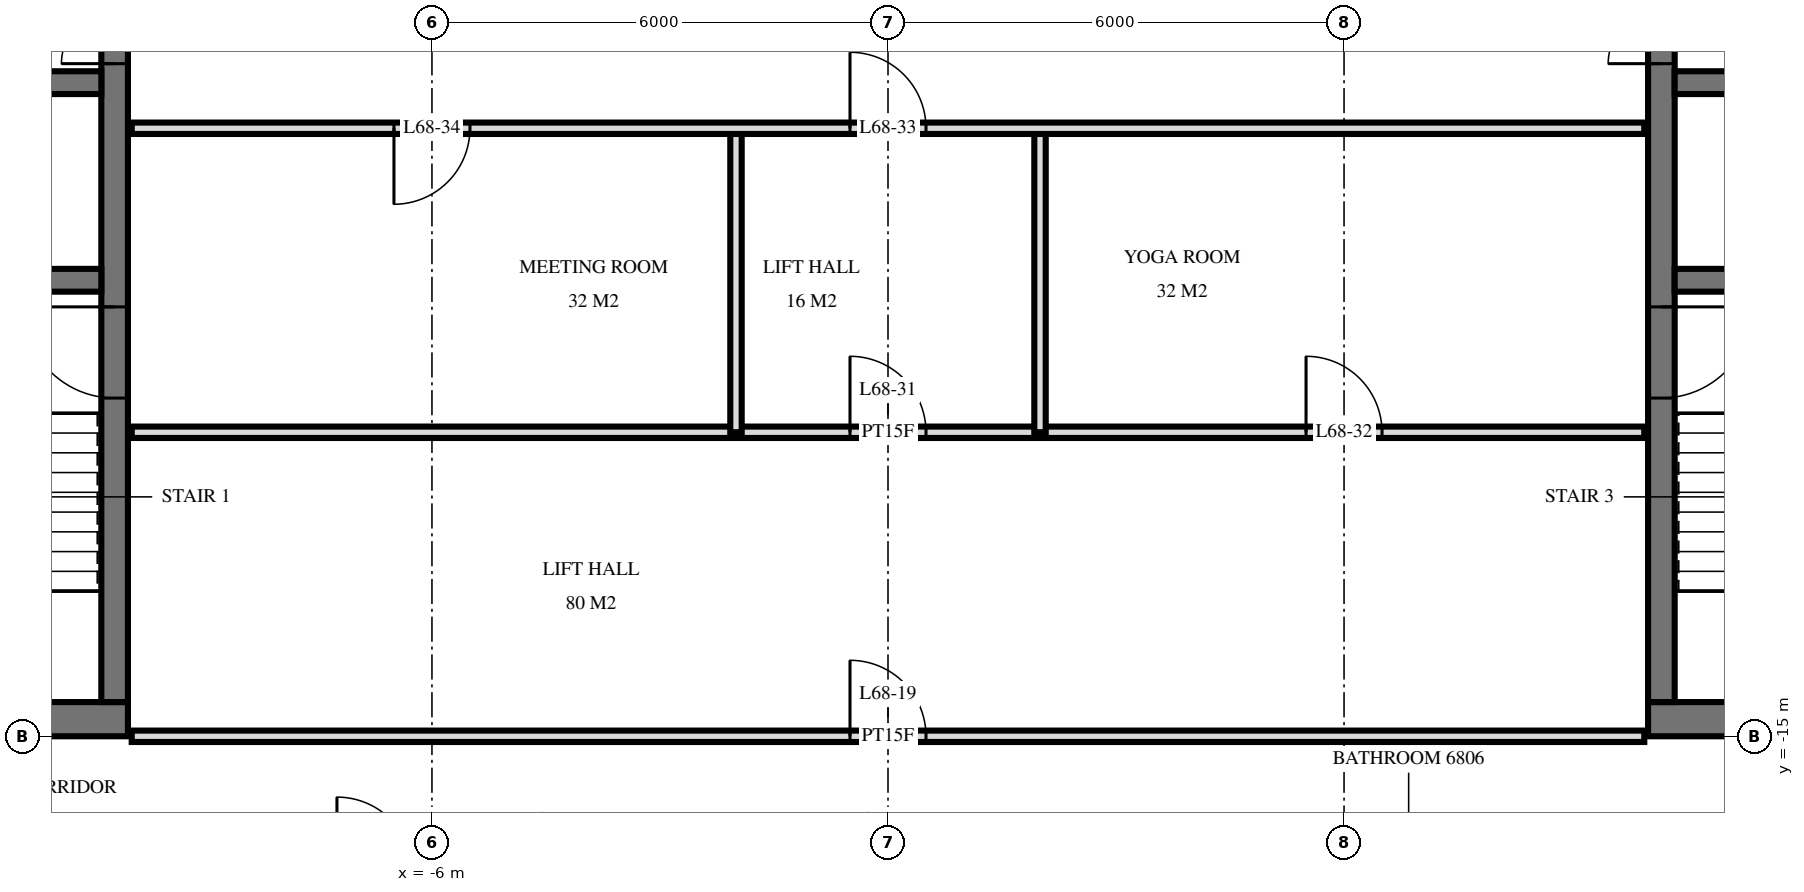
"""IFC4 building model, lengths in metres.
Left out: names, types, materials, properties, quantities, classifications, styles, units other than length and angle.
Written with IfcOpenShell. Run it as: python <this file> out.ifc"""

import sys

from ifc_helpers import new_model, si_unit, direction, frame, frame_2d, origin, place, context, subcontext, project, spatial, rectangle, extrude, element, fill, save


model = new_model("IFC4")
c1 = context("Model", 3, precision=1e-05, world=origin(), true_north=direction((0.0, 1.0)))
c2 = subcontext(c1, "Body", "Model", "MODEL_VIEW")
j1 = project(units=[si_unit("LENGTHUNIT", "METRE"), si_unit("PLANEANGLEUNIT", "RADIAN")], contexts=[c1])
p1 = place(None, origin())
s1 = spatial("IfcSite", under=j1, at=p1, CompositionType="ELEMENT")
p2 = place(p1, origin())
s2 = spatial("IfcBuilding", under=s1, at=p2, CompositionType="ELEMENT")
p3 = place(p2, frame((0.0, 0.0, 259.6)))
s3 = spatial("IfcBuildingStorey", under=s2, at=p3, CompositionType="ELEMENT", Elevation=259.6)
p4 = place(p3, frame((-19.5, -14.775, 0.0), z_axis=(0.0, 0.0, 1.0), x_axis=(1.0, 0.0, 0.0)))
e1 = element("IfcWall", 1, at=p4, inside=s3, PredefinedType="SHEAR", context=c2, shape_type="SweptSolid", body=[
    extrude(rectangle(XDim=9.5, YDim=0.45, at=frame_2d((4.75, 0.0))), origin(), (0.0, 0.0, 1.0), 3.5),
])
p5 = place(p4, frame((1.2, 0.0, 0.0)))
e2 = element("IfcOpeningElement", 2, at=p5, cuts=e1, PredefinedType="OPENING", context=c2, shape_type="SweptSolid", body=[
    extrude(rectangle(XDim=1.2, YDim=2.1, at=frame_2d((0.6, 1.05))), frame((0.0, 0.235, 0.0), z_axis=(0.0, -1.0, 0.0), x_axis=(1.0, 0.0, 0.0)), (0.0, 0.0, 1.0), 0.47),
])
p6 = place(p4, frame((4.25, 0.0, 0.0)))
e3 = element("IfcOpeningElement", 3, at=p6, cuts=e1, PredefinedType="OPENING", context=c2, shape_type="SweptSolid", body=[
    extrude(rectangle(XDim=1.1, YDim=2.1, at=frame_2d((0.55, 1.05))), frame((0.0, 0.235, 0.0), z_axis=(0.0, -1.0, 0.0), x_axis=(1.0, 0.0, 0.0)), (0.0, 0.0, 1.0), 0.47),
])
p7 = place(p3, frame((-10.175, -14.55, 0.0), z_axis=(0.0, 0.0, 1.0), x_axis=(0.0, 1.0, 0.0)))
e4 = element("IfcWall", 4, at=p7, inside=s3, PredefinedType="SHEAR", context=c2, shape_type="SweptSolid", body=[
    extrude(rectangle(XDim=14.1, YDim=0.35, at=frame_2d((7.05, 0.0))), origin(), (0.0, 0.0, 1.0), 3.5),
])
p8 = place(p7, frame((8.4, 0.0, 0.0)))
e5 = element("IfcOpeningElement", 5, at=p8, cuts=e4, PredefinedType="OPENING", context=c2, shape_type="SweptSolid", body=[
    extrude(rectangle(XDim=1.4, YDim=2.4, at=frame_2d((0.7, 1.2))), frame((0.0, 0.185, 0.0), z_axis=(0.0, -1.0, 0.0), x_axis=(1.0, 0.0, 0.0)), (0.0, 0.0, 1.0), 0.37),
])
p9 = place(p7, frame((10.0, 0.0, 0.0)))
e6 = element("IfcOpeningElement", 6, at=p9, cuts=e4, PredefinedType="OPENING", context=c2, shape_type="SweptSolid", body=[
    extrude(rectangle(XDim=1.4, YDim=2.4, at=frame_2d((0.7, 1.2))), frame((0.0, 0.185, 0.0), z_axis=(0.0, -1.0, 0.0), x_axis=(1.0, 0.0, 0.0)), (0.0, 0.0, 1.0), 0.37),
])
p10 = place(p7, frame((4.0, 0.0, 0.0)))
e7 = element("IfcOpeningElement", 7, at=p10, cuts=e4, PredefinedType="OPENING", context=c2, shape_type="SweptSolid", body=[
    extrude(rectangle(XDim=1.2, YDim=2.1, at=frame_2d((0.6, 1.05))), frame((0.0, 0.185, 0.0), z_axis=(0.0, -1.0, 0.0), x_axis=(1.0, 0.0, 0.0)), (0.0, 0.0, 1.0), 0.37),
])
p11 = place(p3, frame((-19.05, -6.4, 0.0), z_axis=(0.0, 0.0, 1.0), x_axis=(1.0, 0.0, 0.0)))
e8 = element("IfcWall", 8, at=p11, inside=s3, PredefinedType="SHEAR", context=c2, shape_type="SweptSolid", body=[
    extrude(rectangle(XDim=8.7, YDim=0.3, at=frame_2d((4.35, 0.0))), origin(), (0.0, 0.0, 1.0), 3.5),
])
p12 = place(p11, frame((0.8, 0.0, 0.0)))
e9 = element("IfcOpeningElement", 9, at=p12, cuts=e8, PredefinedType="OPENING", context=c2, shape_type="SweptSolid", body=[
    extrude(rectangle(XDim=1.1, YDim=2.1, at=frame_2d((0.55, 1.05))), frame((0.0, 0.16, 0.0), z_axis=(0.0, -1.0, 0.0), x_axis=(1.0, 0.0, 0.0)), (0.0, 0.0, 1.0), 0.32),
])
p13 = place(p3, frame((-19.05, -9.0, 0.0), z_axis=(0.0, 0.0, 1.0), x_axis=(1.0, 0.0, 0.0)))
e10 = element("IfcWall", 10, at=p13, inside=s3, PredefinedType="SHEAR", context=c2, shape_type="SweptSolid", body=[
    extrude(rectangle(XDim=8.7, YDim=0.3, at=frame_2d((4.35, 0.0))), origin(), (0.0, 0.0, 1.0), 3.5),
])
p14 = place(p13, frame((3.8, 0.0, 0.0)))
e11 = element("IfcOpeningElement", 11, at=p14, cuts=e10, PredefinedType="OPENING", context=c2, shape_type="SweptSolid", body=[
    extrude(rectangle(XDim=1.1, YDim=2.1, at=frame_2d((0.55, 1.05))), frame((0.0, 0.16, 0.0), z_axis=(0.0, -1.0, 0.0), x_axis=(1.0, 0.0, 0.0)), (0.0, 0.0, 1.0), 0.32),
])
p15 = place(p3, frame((10.0, -14.775, 0.0), z_axis=(0.0, 0.0, 1.0), x_axis=(1.0, 0.0, 0.0)))
e12 = element("IfcWall", 12, at=p15, inside=s3, PredefinedType="SHEAR", context=c2, shape_type="SweptSolid", body=[
    extrude(rectangle(XDim=9.5, YDim=0.45, at=frame_2d((4.75, 0.0))), origin(), (0.0, 0.0, 1.0), 3.5),
])
p16 = place(p15, frame((7.1, 0.0, 0.0)))
e13 = element("IfcOpeningElement", 13, at=p16, cuts=e12, PredefinedType="OPENING", context=c2, shape_type="SweptSolid", body=[
    extrude(rectangle(XDim=1.2, YDim=2.1, at=frame_2d((0.6, 1.05))), frame((0.0, 0.235, 0.0), z_axis=(0.0, -1.0, 0.0), x_axis=(1.0, 0.0, 0.0)), (0.0, 0.0, 1.0), 0.47),
])
p17 = place(p15, frame((4.15, 0.0, 0.0)))
e14 = element("IfcOpeningElement", 14, at=p17, cuts=e12, PredefinedType="OPENING", context=c2, shape_type="SweptSolid", body=[
    extrude(rectangle(XDim=1.1, YDim=2.1, at=frame_2d((0.55, 1.05))), frame((0.0, 0.235, 0.0), z_axis=(0.0, -1.0, 0.0), x_axis=(1.0, 0.0, 0.0)), (0.0, 0.0, 1.0), 0.47),
])
p18 = place(p3, frame((10.175, -14.55, 0.0), z_axis=(0.0, 0.0, 1.0), x_axis=(0.0, 1.0, 0.0)))
e15 = element("IfcWall", 15, at=p18, inside=s3, PredefinedType="SHEAR", context=c2, shape_type="SweptSolid", body=[
    extrude(rectangle(XDim=14.1, YDim=0.35, at=frame_2d((7.05, 0.0))), origin(), (0.0, 0.0, 1.0), 3.5),
])
p19 = place(p18, frame((8.4, 0.0, 0.0)))
e16 = element("IfcOpeningElement", 16, at=p19, cuts=e15, PredefinedType="OPENING", context=c2, shape_type="SweptSolid", body=[
    extrude(rectangle(XDim=1.4, YDim=2.4, at=frame_2d((0.7, 1.2))), frame((0.0, 0.185, 0.0), z_axis=(0.0, -1.0, 0.0), x_axis=(1.0, 0.0, 0.0)), (0.0, 0.0, 1.0), 0.37),
])
p20 = place(p18, frame((10.0, 0.0, 0.0)))
e17 = element("IfcOpeningElement", 17, at=p20, cuts=e15, PredefinedType="OPENING", context=c2, shape_type="SweptSolid", body=[
    extrude(rectangle(XDim=1.4, YDim=2.4, at=frame_2d((0.7, 1.2))), frame((0.0, 0.185, 0.0), z_axis=(0.0, -1.0, 0.0), x_axis=(1.0, 0.0, 0.0)), (0.0, 0.0, 1.0), 0.37),
])
p21 = place(p18, frame((4.0, 0.0, 0.0)))
e18 = element("IfcOpeningElement", 18, at=p21, cuts=e15, PredefinedType="OPENING", context=c2, shape_type="SweptSolid", body=[
    extrude(rectangle(XDim=1.2, YDim=2.1, at=frame_2d((0.6, 1.05))), frame((0.0, 0.185, 0.0), z_axis=(0.0, -1.0, 0.0), x_axis=(1.0, 0.0, 0.0)), (0.0, 0.0, 1.0), 0.37),
])
p22 = place(p3, frame((10.35, -6.4, 0.0), z_axis=(0.0, 0.0, 1.0), x_axis=(1.0, 0.0, 0.0)))
e19 = element("IfcWall", 19, at=p22, inside=s3, PredefinedType="SHEAR", context=c2, shape_type="SweptSolid", body=[
    extrude(rectangle(XDim=8.7, YDim=0.3, at=frame_2d((4.35, 0.0))), origin(), (0.0, 0.0, 1.0), 3.5),
])
p23 = place(p22, frame((6.8, 0.0, 0.0)))
e20 = element("IfcOpeningElement", 20, at=p23, cuts=e19, PredefinedType="OPENING", context=c2, shape_type="SweptSolid", body=[
    extrude(rectangle(XDim=1.1, YDim=2.1, at=frame_2d((0.55, 1.05))), frame((0.0, 0.16, 0.0), z_axis=(0.0, -1.0, 0.0), x_axis=(1.0, 0.0, 0.0)), (0.0, 0.0, 1.0), 0.32),
])
p24 = place(p3, frame((10.35, -9.0, 0.0), z_axis=(0.0, 0.0, 1.0), x_axis=(1.0, 0.0, 0.0)))
e21 = element("IfcWall", 21, at=p24, inside=s3, PredefinedType="SHEAR", context=c2, shape_type="SweptSolid", body=[
    extrude(rectangle(XDim=8.7, YDim=0.3, at=frame_2d((4.35, 0.0))), origin(), (0.0, 0.0, 1.0), 3.5),
])
p25 = place(p24, frame((3.8, 0.0, 0.0)))
e22 = element("IfcOpeningElement", 22, at=p25, cuts=e21, PredefinedType="OPENING", context=c2, shape_type="SweptSolid", body=[
    extrude(rectangle(XDim=1.1, YDim=2.1, at=frame_2d((0.55, 1.05))), frame((0.0, 0.16, 0.0), z_axis=(0.0, -1.0, 0.0), x_axis=(1.0, 0.0, 0.0)), (0.0, 0.0, 1.0), 0.32),
])
for number, where, z_axis, x_axis in (
    (23, (2.0, -11.0, 0.0), (0.0, 0.0, 1.0), (0.0, 1.0, 0.0)),
    (24, (-2.0, -11.0, 0.0), (0.0, 0.0, 1.0), (0.0, 1.0, 0.0)),
):
    element("IfcWall", number, at=place(p3, frame(where, z_axis=z_axis, x_axis=x_axis)), inside=s3, PredefinedType="PARTITIONING", context=c2, shape_type="SweptSolid", body=[
        extrude(rectangle(XDim=4.0, YDim=0.15, at=frame_2d((2.0, 0.0))), origin(), (0.0, 0.0, 1.0), 3.22),
    ])
p26 = place(p3, frame((-9.95, -15.0, 0.0), z_axis=(0.0, 0.0, 1.0), x_axis=(1.0, 0.0, 0.0)))
e25 = element("IfcWall", 25, at=p26, inside=s3, PredefinedType="PARTITIONING", context=c2, shape_type="SweptSolid", body=[
    extrude(rectangle(XDim=19.9, YDim=0.15, at=frame_2d((9.95, 0.0))), origin(), (0.0, 0.0, 1.0), 2.584),
])
p27 = place(p26, frame((9.45, 0.0, 0.0)))
e26 = element("IfcOpeningElement", 26, at=p27, cuts=e25, PredefinedType="OPENING", context=c2, shape_type="SweptSolid", body=[
    extrude(rectangle(XDim=1.0, YDim=2.1, at=frame_2d((0.5, 1.05))), frame((0.0, 0.085, 0.0), z_axis=(0.0, -1.0, 0.0), x_axis=(1.0, 0.0, 0.0)), (0.0, 0.0, 1.0), 0.17),
])
p28 = place(p3, frame((-9.95, -11.0, 0.0), z_axis=(0.0, 0.0, 1.0), x_axis=(1.0, 0.0, 0.0)))
e27 = element("IfcWall", 27, at=p28, inside=s3, PredefinedType="PARTITIONING", context=c2, shape_type="SweptSolid", body=[
    extrude(rectangle(XDim=19.9, YDim=0.15, at=frame_2d((9.95, 0.0))), origin(), (0.0, 0.0, 1.0), 3.22),
])
p29 = place(p28, frame((9.45, 0.0, 0.0)))
e28 = element("IfcOpeningElement", 28, at=p29, cuts=e27, PredefinedType="OPENING", context=c2, shape_type="SweptSolid", body=[
    extrude(rectangle(XDim=1.0, YDim=2.1, at=frame_2d((0.5, 1.05))), frame((0.0, 0.085, 0.0), z_axis=(0.0, -1.0, 0.0), x_axis=(1.0, 0.0, 0.0)), (0.0, 0.0, 1.0), 0.17),
])
p30 = place(p28, frame((15.45, 0.0, 0.0)))
e29 = element("IfcOpeningElement", 29, at=p30, cuts=e27, PredefinedType="OPENING", context=c2, shape_type="SweptSolid", body=[
    extrude(rectangle(XDim=1.0, YDim=2.1, at=frame_2d((0.5, 1.05))), frame((0.0, 0.085, 0.0), z_axis=(0.0, -1.0, 0.0), x_axis=(1.0, 0.0, 0.0)), (0.0, 0.0, 1.0), 0.17),
])
p31 = place(p3, frame((-9.95, -7.0, 0.0), z_axis=(0.0, 0.0, 1.0), x_axis=(1.0, 0.0, 0.0)))
e30 = element("IfcWall", 30, at=p31, inside=s3, PredefinedType="PARTITIONING", context=c2, shape_type="SweptSolid", body=[
    extrude(rectangle(XDim=19.9, YDim=0.15, at=frame_2d((9.95, 0.0))), origin(), (0.0, 0.0, 1.0), 3.22),
])
p32 = place(p31, frame((9.45, 0.0, 0.0)))
e31 = element("IfcOpeningElement", 31, at=p32, cuts=e30, PredefinedType="OPENING", context=c2, shape_type="SweptSolid", body=[
    extrude(rectangle(XDim=1.0, YDim=2.1, at=frame_2d((0.5, 1.05))), frame((0.0, 0.085, 0.0), z_axis=(0.0, -1.0, 0.0), x_axis=(1.0, 0.0, 0.0)), (0.0, 0.0, 1.0), 0.17),
])
p33 = place(p31, frame((3.45, 0.0, 0.0)))
e32 = element("IfcOpeningElement", 32, at=p33, cuts=e30, PredefinedType="OPENING", context=c2, shape_type="SweptSolid", body=[
    extrude(rectangle(XDim=1.0, YDim=2.1, at=frame_2d((0.5, 1.05))), frame((0.0, 0.085, 0.0), z_axis=(0.0, -1.0, 0.0), x_axis=(1.0, 0.0, 0.0)), (0.0, 0.0, 1.0), 0.17),
])
p34 = place(p8, origin())
e33 = element("IfcDoor", 33, at=p34, inside=s3, OperationType="DOUBLE_DOOR_SINGLE_SWING", PredefinedType="DOOR", context=c2, shape_type="SweptSolid", body=[
    extrude(rectangle(XDim=1.4, YDim=2.4, at=frame_2d((0.7, 1.2))), frame((0.0, 0.025, 0.0), z_axis=(0.0, -1.0, 0.0), x_axis=(1.0, 0.0, 0.0)), (0.0, 0.0, 1.0), 0.05),
])
fill(e5, e33)
p35 = place(p10, origin())
e34 = element("IfcDoor", 34, at=p35, inside=s3, OperationType="SINGLE_SWING_LEFT", PredefinedType="DOOR", context=c2, shape_type="SweptSolid", body=[
    extrude(rectangle(XDim=1.2, YDim=2.1, at=frame_2d((0.6, 1.05))), frame((0.0, 0.025, 0.0), z_axis=(0.0, -1.0, 0.0), x_axis=(1.0, 0.0, 0.0)), (0.0, 0.0, 1.0), 0.05),
])
fill(e7, e34)
p36 = place(p19, origin())
e35 = element("IfcDoor", 35, at=p36, inside=s3, OperationType="DOUBLE_DOOR_SINGLE_SWING", PredefinedType="DOOR", context=c2, shape_type="SweptSolid", body=[
    extrude(rectangle(XDim=1.4, YDim=2.4, at=frame_2d((0.7, 1.2))), frame((0.0, 0.025, 0.0), z_axis=(0.0, -1.0, 0.0), x_axis=(1.0, 0.0, 0.0)), (0.0, 0.0, 1.0), 0.05),
])
fill(e16, e35)
p37 = place(p21, frame((0.6, 0.0, 0.0), z_axis=(0.0, 0.0, 1.0), x_axis=(-1.0, 0.0, 0.0)))
e36 = element("IfcDoor", 36, at=p37, inside=s3, OperationType="SINGLE_SWING_RIGHT", PredefinedType="DOOR", context=c2, shape_type="SweptSolid", body=[
    extrude(rectangle(XDim=1.2, YDim=2.1, at=frame_2d((0.0, 1.05))), frame((0.0, -0.025, 0.0), z_axis=(0.0, 1.0, 0.0), x_axis=(-1.0, 0.0, 0.0)), (0.0, 0.0, 1.0), 0.05),
])
fill(e18, e36)
p38 = place(p27, origin())
e37 = element("IfcDoor", 37, at=p38, inside=s3, OperationType="SINGLE_SWING_RIGHT", PredefinedType="DOOR", context=c2, shape_type="SweptSolid", body=[
    extrude(rectangle(XDim=1.0, YDim=2.1, at=frame_2d((0.5, 1.05))), frame((0.0, 0.025, 0.0), z_axis=(0.0, -1.0, 0.0), x_axis=(1.0, 0.0, 0.0)), (0.0, 0.0, 1.0), 0.05),
])
fill(e26, e37)
p39 = place(p29, origin())
e38 = element("IfcDoor", 38, at=p39, inside=s3, OperationType="SINGLE_SWING_RIGHT", PredefinedType="DOOR", context=c2, shape_type="SweptSolid", body=[
    extrude(rectangle(XDim=1.0, YDim=2.1, at=frame_2d((0.5, 1.05))), frame((0.0, 0.025, 0.0), z_axis=(0.0, -1.0, 0.0), x_axis=(1.0, 0.0, 0.0)), (0.0, 0.0, 1.0), 0.05),
])
fill(e28, e38)
p40 = place(p30, origin())
e39 = element("IfcDoor", 39, at=p40, inside=s3, OperationType="SINGLE_SWING_RIGHT", PredefinedType="DOOR", context=c2, shape_type="SweptSolid", body=[
    extrude(rectangle(XDim=1.0, YDim=2.1, at=frame_2d((0.5, 1.05))), frame((0.0, 0.025, 0.0), z_axis=(0.0, -1.0, 0.0), x_axis=(1.0, 0.0, 0.0)), (0.0, 0.0, 1.0), 0.05),
])
fill(e29, e39)
p41 = place(p32, origin())
e40 = element("IfcDoor", 40, at=p41, inside=s3, OperationType="SINGLE_SWING_RIGHT", PredefinedType="DOOR", context=c2, shape_type="SweptSolid", body=[
    extrude(rectangle(XDim=1.0, YDim=2.1, at=frame_2d((0.5, 1.05))), frame((0.0, 0.025, 0.0), z_axis=(0.0, -1.0, 0.0), x_axis=(1.0, 0.0, 0.0)), (0.0, 0.0, 1.0), 0.05),
])
fill(e31, e40)
p42 = place(p33, frame((0.5, 0.0, 0.0), z_axis=(0.0, 0.0, 1.0), x_axis=(-1.0, 0.0, 0.0)))
e41 = element("IfcDoor", 41, at=p42, inside=s3, OperationType="SINGLE_SWING_LEFT", PredefinedType="DOOR", context=c2, shape_type="SweptSolid", body=[
    extrude(rectangle(XDim=1.0, YDim=2.1, at=frame_2d((0.0, 1.05))), frame((0.0, -0.025, 0.0), z_axis=(0.0, 1.0, 0.0), x_axis=(-1.0, 0.0, 0.0)), (0.0, 0.0, 1.0), 0.05),
])
fill(e32, e41)
save(model, sys.argv[1])
